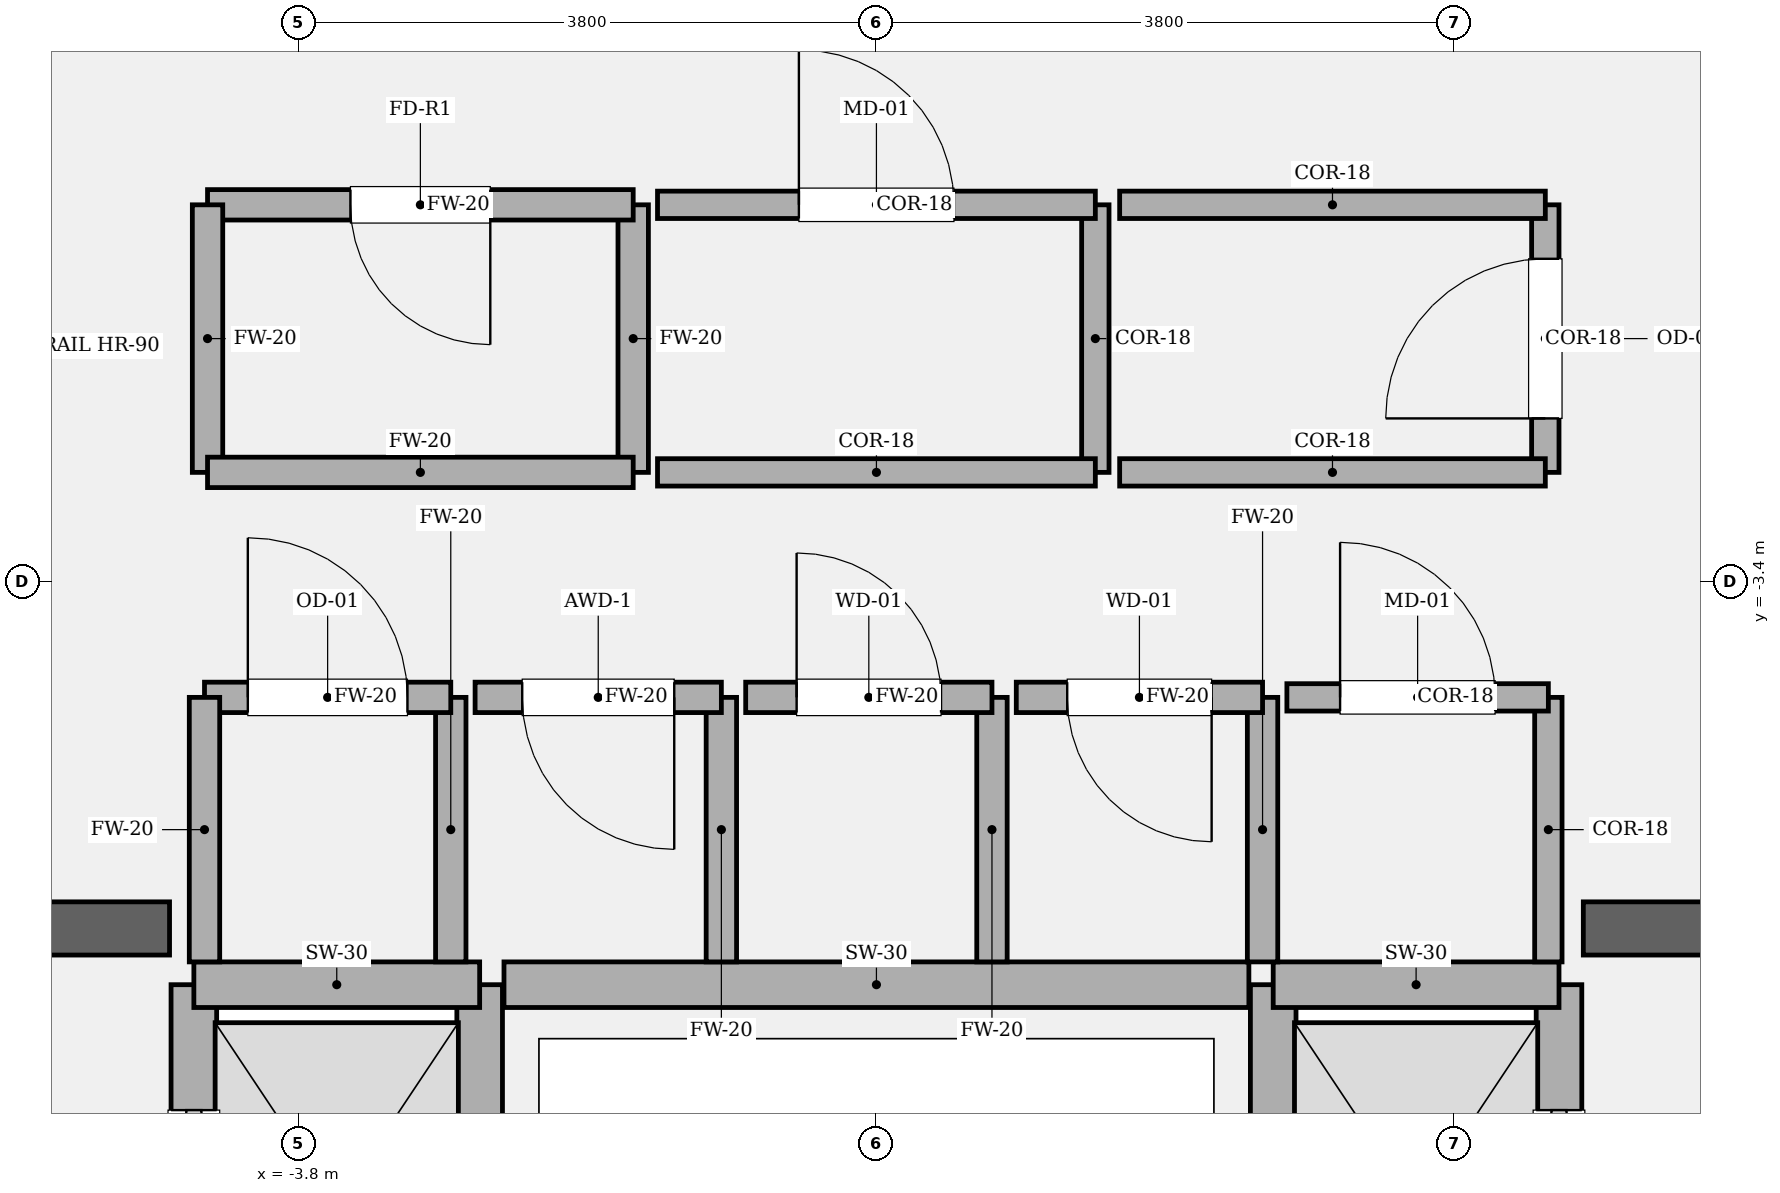
"""IFC4 building model, lengths in metres.
Left out: names, types, materials, properties, quantities, classifications, styles, units other than length and angle.
Written with IfcOpenShell. Run it as: python <this file> out.ifc"""

import sys

from ifc_helpers import new_model, si_unit, direction, frame, frame_2d, origin, place, context, subcontext, project, spatial, rectangle, extrude, element, fill, save


model = new_model("IFC4")
c1 = context("Model", 3, precision=1e-05, world=origin(), true_north=direction((0.0, 1.0)))
c2 = subcontext(c1, "Body", "Model", "MODEL_VIEW")
j1 = project(units=[si_unit("LENGTHUNIT", "METRE"), si_unit("PLANEANGLEUNIT", "RADIAN")], contexts=[c1])
p1 = place(None, origin())
s1 = spatial("IfcSite", under=j1, at=p1, CompositionType="ELEMENT")
p2 = place(p1, origin())
s2 = spatial("IfcBuilding", under=s1, at=p2, CompositionType="ELEMENT")
p3 = place(p2, frame((0.0, 0.0, 304.8)))
s3 = spatial("IfcBuildingStorey", under=s2, at=p3, CompositionType="ELEMENT", Elevation=304.8)
p4 = place(p3, frame((-9.925, -5.68, 0.0), z_axis=(0.0, 0.0, 1.0), x_axis=(1.0, 0.0, 0.0)))
e1 = element("IfcWall", 1, at=p4, inside=s3, PredefinedType="SOLIDWALL", context=c2, shape_type="SweptSolid", body=[
    extrude(rectangle(XDim=5.275, YDim=0.35, at=frame_2d((2.638, 0.0))), origin(), (0.0, 0.0, 1.0), 4.2),
])
p5 = place(p4, frame((1.385, 0.0, 0.0)))
e2 = element("IfcOpeningElement", 2, at=p5, cuts=e1, PredefinedType="OPENING", context=c2, shape_type="SweptSolid", body=[
    extrude(rectangle(XDim=1.18, YDim=2.2, at=frame_2d((0.59, 1.1))), frame((0.0, 0.185, 0.0), z_axis=(0.0, -1.0, 0.0), x_axis=(1.0, 0.0, 0.0)), (0.0, 0.0, 1.0), 0.37),
])
p6 = place(p3, frame((4.65, -5.68, 0.0), z_axis=(0.0, 0.0, 1.0), x_axis=(1.0, 0.0, 0.0)))
e3 = element("IfcWall", 3, at=p6, inside=s3, PredefinedType="SOLIDWALL", context=c2, shape_type="SweptSolid", body=[
    extrude(rectangle(XDim=5.275, YDim=0.35, at=frame_2d((2.638, 0.0))), origin(), (0.0, 0.0, 1.0), 4.2),
])
p7 = place(p6, frame((2.71, 0.0, 0.0)))
e4 = element("IfcOpeningElement", 4, at=p7, cuts=e3, PredefinedType="OPENING", context=c2, shape_type="SweptSolid", body=[
    extrude(rectangle(XDim=1.18, YDim=2.2, at=frame_2d((0.59, 1.1))), frame((0.0, 0.185, 0.0), z_axis=(0.0, -1.0, 0.0), x_axis=(1.0, 0.0, 0.0)), (0.0, 0.0, 1.0), 0.37),
])
p8 = place(p3, frame((-4.49, -8.82, 0.0), z_axis=(0.0, 0.0, 1.0), x_axis=(0.0, 1.0, 0.0)))
e5 = element("IfcWall", 5, at=p8, inside=s3, PredefinedType="SOLIDWALL", context=c2, shape_type="SweptSolid", body=[
    extrude(rectangle(XDim=2.77, YDim=0.3, at=frame_2d((1.385, 0.0))), origin(), (0.0, 0.0, 1.0), 4.0),
])
p9 = place(p8, frame((0.825, 0.0, 0.0)))
e6 = element("IfcOpeningElement", 6, at=p9, cuts=e5, PredefinedType="OPENING", context=c2, shape_type="SweptSolid", body=[
    extrude(rectangle(XDim=1.12, YDim=2.25, at=frame_2d((0.56, 1.125))), frame((0.0, 0.16, 0.0), z_axis=(0.0, -1.0, 0.0), x_axis=(1.0, 0.0, 0.0)), (0.0, 0.0, 1.0), 0.32),
])
p10 = place(p3, frame((-2.61, -8.82, 0.0), z_axis=(0.0, 0.0, 1.0), x_axis=(0.0, 1.0, 0.0)))
e7 = element("IfcWall", 7, at=p10, inside=s3, PredefinedType="SOLIDWALL", context=c2, shape_type="SweptSolid", body=[
    extrude(rectangle(XDim=2.77, YDim=0.3, at=frame_2d((1.385, 0.0))), origin(), (0.0, 0.0, 1.0), 4.0),
])
p11 = place(p3, frame((-4.49, -6.05, 0.0), z_axis=(0.0, 0.0, 1.0), x_axis=(1.0, 0.0, 0.0)))
e8 = element("IfcWall", 8, at=p11, inside=s3, PredefinedType="SOLIDWALL", context=c2, shape_type="SweptSolid", body=[
    extrude(rectangle(XDim=1.88, YDim=0.3, at=frame_2d((0.94, 0.0))), origin(), (0.0, 0.0, 1.0), 4.0),
])
p12 = place(p3, frame((4.49, -8.82, 0.0), z_axis=(0.0, 0.0, 1.0), x_axis=(0.0, 1.0, 0.0)))
e9 = element("IfcWall", 9, at=p12, inside=s3, PredefinedType="SOLIDWALL", context=c2, shape_type="SweptSolid", body=[
    extrude(rectangle(XDim=2.77, YDim=0.3, at=frame_2d((1.385, 0.0))), origin(), (0.0, 0.0, 1.0), 4.0),
])
p13 = place(p12, frame((0.825, 0.0, 0.0)))
e10 = element("IfcOpeningElement", 10, at=p13, cuts=e9, PredefinedType="OPENING", context=c2, shape_type="SweptSolid", body=[
    extrude(rectangle(XDim=1.12, YDim=2.25, at=frame_2d((0.56, 1.125))), frame((0.0, 0.16, 0.0), z_axis=(0.0, -1.0, 0.0), x_axis=(1.0, 0.0, 0.0)), (0.0, 0.0, 1.0), 0.32),
])
p14 = place(p3, frame((2.61, -8.82, 0.0), z_axis=(0.0, 0.0, 1.0), x_axis=(0.0, 1.0, 0.0)))
e11 = element("IfcWall", 11, at=p14, inside=s3, PredefinedType="SOLIDWALL", context=c2, shape_type="SweptSolid", body=[
    extrude(rectangle(XDim=2.77, YDim=0.3, at=frame_2d((1.385, 0.0))), origin(), (0.0, 0.0, 1.0), 4.0),
])
p15 = place(p3, frame((2.61, -6.05, 0.0), z_axis=(0.0, 0.0, 1.0), x_axis=(1.0, 0.0, 0.0)))
e12 = element("IfcWall", 12, at=p15, inside=s3, PredefinedType="SOLIDWALL", context=c2, shape_type="SweptSolid", body=[
    extrude(rectangle(XDim=1.88, YDim=0.3, at=frame_2d((0.94, 0.0))), origin(), (0.0, 0.0, 1.0), 4.0),
])
p16 = place(p3, frame((-2.45, -6.05, 0.0), z_axis=(0.0, 0.0, 1.0), x_axis=(1.0, 0.0, 0.0)))
e13 = element("IfcWall", 13, at=p16, inside=s3, PredefinedType="SOLIDWALL", context=c2, shape_type="SweptSolid", body=[
    extrude(rectangle(XDim=4.9, YDim=0.3, at=frame_2d((2.45, 0.0))), origin(), (0.0, 0.0, 1.0), 4.0),
])
p17 = place(p3, frame((-2.8, -5.9, 0.0), z_axis=(0.0, 0.0, 1.0), x_axis=(0.0, 1.0, 0.0)))
e14 = element("IfcWall", 14, at=p17, inside=s3, PredefinedType="SOLIDWALL", context=c2, shape_type="SweptSolid", body=[
    extrude(rectangle(XDim=1.74, YDim=0.2, at=frame_2d((0.87, 0.0))), origin(), (0.0, 0.0, 1.0), 4.0),
])
p18 = place(p3, frame((-2.8, -4.16, 0.0), z_axis=(0.0, 0.0, 1.0), x_axis=(-1.0, 0.0, 0.0)))
e15 = element("IfcWall", 15, at=p18, inside=s3, PredefinedType="SOLIDWALL", context=c2, shape_type="SweptSolid", body=[
    extrude(rectangle(XDim=1.62, YDim=0.2, at=frame_2d((0.81, 0.0))), origin(), (0.0, 0.0, 1.0), 4.0),
])
p19 = place(p18, frame((0.285, 0.0, 0.0)))
e16 = element("IfcOpeningElement", 16, at=p19, cuts=e15, PredefinedType="OPENING", context=c2, shape_type="SweptSolid", body=[
    extrude(rectangle(XDim=1.05, YDim=2.2, at=frame_2d((0.525, 1.1))), frame((0.0, 0.11, 0.0), z_axis=(0.0, -1.0, 0.0), x_axis=(1.0, 0.0, 0.0)), (0.0, 0.0, 1.0), 0.22),
])
for number, where, z_axis, x_axis in (
    (17, (-4.42, -4.16, 0.0), (0.0, 0.0, 1.0), (0.0, -1.0, 0.0)),
    (18, (-1.02, -5.9, 0.0), (0.0, 0.0, 1.0), (0.0, 1.0, 0.0)),
):
    element("IfcWall", number, at=place(p3, frame(where, z_axis=z_axis, x_axis=x_axis)), inside=s3, PredefinedType="SOLIDWALL", context=c2, shape_type="SweptSolid", body=[
        extrude(rectangle(XDim=1.74, YDim=0.2, at=frame_2d((0.87, 0.0))), origin(), (0.0, 0.0, 1.0), 4.0),
    ])
p20 = place(p3, frame((-1.02, -4.16, 0.0), z_axis=(0.0, 0.0, 1.0), x_axis=(-1.0, 0.0, 0.0)))
e19 = element("IfcWall", 19, at=p20, inside=s3, PredefinedType="SOLIDWALL", context=c2, shape_type="SweptSolid", body=[
    extrude(rectangle(XDim=1.62, YDim=0.2, at=frame_2d((0.81, 0.0))), origin(), (0.0, 0.0, 1.0), 4.0),
])
p21 = place(p20, frame((0.31, 0.0, 0.0)))
e20 = element("IfcOpeningElement", 20, at=p21, cuts=e19, PredefinedType="OPENING", context=c2, shape_type="SweptSolid", body=[
    extrude(rectangle(XDim=1.0, YDim=2.15, at=frame_2d((0.5, 1.075))), frame((0.0, 0.11, 0.0), z_axis=(0.0, -1.0, 0.0), x_axis=(1.0, 0.0, 0.0)), (0.0, 0.0, 1.0), 0.22),
])
p22 = place(p3, frame((0.76, -5.9, 0.0), z_axis=(0.0, 0.0, 1.0), x_axis=(0.0, 1.0, 0.0)))
e21 = element("IfcWall", 21, at=p22, inside=s3, PredefinedType="SOLIDWALL", context=c2, shape_type="SweptSolid", body=[
    extrude(rectangle(XDim=1.74, YDim=0.2, at=frame_2d((0.87, 0.0))), origin(), (0.0, 0.0, 1.0), 4.0),
])
p23 = place(p3, frame((0.76, -4.16, 0.0), z_axis=(0.0, 0.0, 1.0), x_axis=(-1.0, 0.0, 0.0)))
e22 = element("IfcWall", 22, at=p23, inside=s3, PredefinedType="SOLIDWALL", context=c2, shape_type="SweptSolid", body=[
    extrude(rectangle(XDim=1.62, YDim=0.2, at=frame_2d((0.81, 0.0))), origin(), (0.0, 0.0, 1.0), 4.0),
])
p24 = place(p23, frame((0.335, 0.0, 0.0)))
e23 = element("IfcOpeningElement", 23, at=p24, cuts=e22, PredefinedType="OPENING", context=c2, shape_type="SweptSolid", body=[
    extrude(rectangle(XDim=0.95, YDim=2.15, at=frame_2d((0.475, 1.075))), frame((0.0, 0.11, 0.0), z_axis=(0.0, -1.0, 0.0), x_axis=(1.0, 0.0, 0.0)), (0.0, 0.0, 1.0), 0.22),
])
p25 = place(p3, frame((2.54, -5.9, 0.0), z_axis=(0.0, 0.0, 1.0), x_axis=(0.0, 1.0, 0.0)))
e24 = element("IfcWall", 24, at=p25, inside=s3, PredefinedType="SOLIDWALL", context=c2, shape_type="SweptSolid", body=[
    extrude(rectangle(XDim=1.74, YDim=0.2, at=frame_2d((0.87, 0.0))), origin(), (0.0, 0.0, 1.0), 4.0),
])
p26 = place(p3, frame((2.54, -4.16, 0.0), z_axis=(0.0, 0.0, 1.0), x_axis=(-1.0, 0.0, 0.0)))
e25 = element("IfcWall", 25, at=p26, inside=s3, PredefinedType="SOLIDWALL", context=c2, shape_type="SweptSolid", body=[
    extrude(rectangle(XDim=1.62, YDim=0.2, at=frame_2d((0.81, 0.0))), origin(), (0.0, 0.0, 1.0), 4.0),
])
p27 = place(p26, frame((0.335, 0.0, 0.0)))
e26 = element("IfcOpeningElement", 26, at=p27, cuts=e25, PredefinedType="OPENING", context=c2, shape_type="SweptSolid", body=[
    extrude(rectangle(XDim=0.95, YDim=2.15, at=frame_2d((0.475, 1.075))), frame((0.0, 0.11, 0.0), z_axis=(0.0, -1.0, 0.0), x_axis=(1.0, 0.0, 0.0)), (0.0, 0.0, 1.0), 0.22),
])
p28 = place(p3, frame((4.42, -5.9, 0.0), z_axis=(0.0, 0.0, 1.0), x_axis=(0.0, 1.0, 0.0)))
e27 = element("IfcWall", 27, at=p28, inside=s3, PredefinedType="PARTITIONING", context=c2, shape_type="SweptSolid", body=[
    extrude(rectangle(XDim=1.74, YDim=0.18, at=frame_2d((0.87, 0.0))), origin(), (0.0, 0.0, 1.0), 4.0),
])
p29 = place(p3, frame((4.42, -4.16, 0.0), z_axis=(0.0, 0.0, 1.0), x_axis=(-1.0, 0.0, 0.0)))
e28 = element("IfcWall", 28, at=p29, inside=s3, PredefinedType="PARTITIONING", context=c2, shape_type="SweptSolid", body=[
    extrude(rectangle(XDim=1.72, YDim=0.18, at=frame_2d((0.86, 0.0))), origin(), (0.0, 0.0, 1.0), 4.0),
])
p30 = place(p29, frame((0.35, 0.0, 0.0)))
e29 = element("IfcOpeningElement", 29, at=p30, cuts=e28, PredefinedType="OPENING", context=c2, shape_type="SweptSolid", body=[
    extrude(rectangle(XDim=1.02, YDim=2.2, at=frame_2d((0.51, 1.1))), frame((0.0, 0.1, 0.0), z_axis=(0.0, -1.0, 0.0), x_axis=(1.0, 0.0, 0.0)), (0.0, 0.0, 1.0), 0.2),
])
p31 = place(p3, frame((-1.6, -2.68, 0.0), z_axis=(0.0, 0.0, 1.0), x_axis=(0.0, 1.0, 0.0)))
e30 = element("IfcWall", 30, at=p31, inside=s3, PredefinedType="SOLIDWALL", context=c2, shape_type="SweptSolid", body=[
    extrude(rectangle(XDim=1.76, YDim=0.2, at=frame_2d((0.88, 0.0))), origin(), (0.0, 0.0, 1.0), 4.0),
])
p32 = place(p3, frame((-1.6, -0.92, 0.0), z_axis=(0.0, 0.0, 1.0), x_axis=(-1.0, 0.0, 0.0)))
e31 = element("IfcWall", 31, at=p32, inside=s3, PredefinedType="SOLIDWALL", context=c2, shape_type="SweptSolid", body=[
    extrude(rectangle(XDim=2.8, YDim=0.2, at=frame_2d((1.4, 0.0))), origin(), (0.0, 0.0, 1.0), 4.0),
])
p33 = place(p32, frame((0.94, 0.0, 0.0)))
e32 = element("IfcOpeningElement", 32, at=p33, cuts=e31, PredefinedType="OPENING", context=c2, shape_type="SweptSolid", body=[
    extrude(rectangle(XDim=0.92, YDim=2.1, at=frame_2d((0.46, 1.05))), frame((0.0, 0.11, 0.0), z_axis=(0.0, -1.0, 0.0), x_axis=(1.0, 0.0, 0.0)), (0.0, 0.0, 1.0), 0.22),
])
p34 = place(p3, frame((-4.4, -0.92, 0.0), z_axis=(0.0, 0.0, 1.0), x_axis=(0.0, -1.0, 0.0)))
e33 = element("IfcWall", 33, at=p34, inside=s3, PredefinedType="SOLIDWALL", context=c2, shape_type="SweptSolid", body=[
    extrude(rectangle(XDim=1.76, YDim=0.2, at=frame_2d((0.88, 0.0))), origin(), (0.0, 0.0, 1.0), 4.0),
])
p35 = place(p3, frame((-4.4, -2.68, 0.0), z_axis=(0.0, 0.0, 1.0), x_axis=(1.0, 0.0, 0.0)))
e34 = element("IfcWall", 34, at=p35, inside=s3, PredefinedType="SOLIDWALL", context=c2, shape_type="SweptSolid", body=[
    extrude(rectangle(XDim=2.8, YDim=0.2, at=frame_2d((1.4, 0.0))), origin(), (0.0, 0.0, 1.0), 4.0),
])
p36 = place(p3, frame((1.44, -2.68, 0.0), z_axis=(0.0, 0.0, 1.0), x_axis=(0.0, 1.0, 0.0)))
e35 = element("IfcWall", 35, at=p36, inside=s3, PredefinedType="PARTITIONING", context=c2, shape_type="SweptSolid", body=[
    extrude(rectangle(XDim=1.76, YDim=0.18, at=frame_2d((0.88, 0.0))), origin(), (0.0, 0.0, 1.0), 4.0),
])
p37 = place(p3, frame((1.44, -0.92, 0.0), z_axis=(0.0, 0.0, 1.0), x_axis=(-1.0, 0.0, 0.0)))
e36 = element("IfcWall", 36, at=p37, inside=s3, PredefinedType="PARTITIONING", context=c2, shape_type="SweptSolid", body=[
    extrude(rectangle(XDim=2.88, YDim=0.18, at=frame_2d((1.44, 0.0))), origin(), (0.0, 0.0, 1.0), 4.0),
])
p38 = place(p37, frame((0.93, 0.0, 0.0)))
e37 = element("IfcOpeningElement", 37, at=p38, cuts=e36, PredefinedType="OPENING", context=c2, shape_type="SweptSolid", body=[
    extrude(rectangle(XDim=1.02, YDim=2.2, at=frame_2d((0.51, 1.1))), frame((0.0, 0.1, 0.0), z_axis=(0.0, -1.0, 0.0), x_axis=(1.0, 0.0, 0.0)), (0.0, 0.0, 1.0), 0.2),
])
p39 = place(p3, frame((-1.44, -2.68, 0.0), z_axis=(0.0, 0.0, 1.0), x_axis=(1.0, 0.0, 0.0)))
e38 = element("IfcWall", 38, at=p39, inside=s3, PredefinedType="PARTITIONING", context=c2, shape_type="SweptSolid", body=[
    extrude(rectangle(XDim=2.88, YDim=0.18, at=frame_2d((1.44, 0.0))), origin(), (0.0, 0.0, 1.0), 4.0),
])
p40 = place(p3, frame((4.4, -2.68, 0.0), z_axis=(0.0, 0.0, 1.0), x_axis=(0.0, 1.0, 0.0)))
e39 = element("IfcWall", 39, at=p40, inside=s3, PredefinedType="PARTITIONING", context=c2, shape_type="SweptSolid", body=[
    extrude(rectangle(XDim=1.76, YDim=0.18, at=frame_2d((0.88, 0.0))), origin(), (0.0, 0.0, 1.0), 4.0),
])
p41 = place(p40, frame((0.355, 0.0, 0.0)))
e40 = element("IfcOpeningElement", 40, at=p41, cuts=e39, PredefinedType="OPENING", context=c2, shape_type="SweptSolid", body=[
    extrude(rectangle(XDim=1.05, YDim=2.2, at=frame_2d((0.525, 1.1))), frame((0.0, 0.1, 0.0), z_axis=(0.0, -1.0, 0.0), x_axis=(1.0, 0.0, 0.0)), (0.0, 0.0, 1.0), 0.2),
])
for number, where, z_axis, x_axis in (
    (41, (4.4, -0.92, 0.0), (0.0, 0.0, 1.0), (-1.0, 0.0, 0.0)),
    (42, (1.6, -2.68, 0.0), (0.0, 0.0, 1.0), (1.0, 0.0, 0.0)),
):
    element("IfcWall", number, at=place(p3, frame(where, z_axis=z_axis, x_axis=x_axis)), inside=s3, PredefinedType="PARTITIONING", context=c2, shape_type="SweptSolid", body=[
        extrude(rectangle(XDim=2.8, YDim=0.18, at=frame_2d((1.4, 0.0))), origin(), (0.0, 0.0, 1.0), 4.0),
    ])
p42 = place(p9, origin())
e43 = element("IfcDoor", 43, at=p42, inside=s3, OperationType="SLIDING_TO_LEFT", PredefinedType="DOOR", context=c2, shape_type="SweptSolid", body=[
    extrude(rectangle(XDim=1.12, YDim=2.25, at=frame_2d((0.56, 1.125))), frame((0.0, 0.025, 0.0), z_axis=(0.0, -1.0, 0.0), x_axis=(1.0, 0.0, 0.0)), (0.0, 0.0, 1.0), 0.05),
])
fill(e6, e43)
p43 = place(p13, origin())
e44 = element("IfcDoor", 44, at=p43, inside=s3, OperationType="SLIDING_TO_RIGHT", PredefinedType="DOOR", context=c2, shape_type="SweptSolid", body=[
    extrude(rectangle(XDim=1.12, YDim=2.25, at=frame_2d((0.56, 1.125))), frame((0.0, 0.025, 0.0), z_axis=(0.0, -1.0, 0.0), x_axis=(1.0, 0.0, 0.0)), (0.0, 0.0, 1.0), 0.05),
])
fill(e10, e44)
p44 = place(p19, origin())
e45 = element("IfcDoor", 45, at=p44, inside=s3, OperationType="SINGLE_SWING_RIGHT", PredefinedType="DOOR", context=c2, shape_type="SweptSolid", body=[
    extrude(rectangle(XDim=1.05, YDim=2.2, at=frame_2d((0.525, 1.1))), frame((0.0, 0.025, 0.0), z_axis=(0.0, -1.0, 0.0), x_axis=(1.0, 0.0, 0.0)), (0.0, 0.0, 1.0), 0.05),
])
fill(e16, e45)
p45 = place(p21, origin())
e46 = element("IfcDoor", 46, at=p45, inside=s3, OperationType="SINGLE_SWING_LEFT", PredefinedType="DOOR", context=c2, shape_type="SweptSolid", body=[
    extrude(rectangle(XDim=1.0, YDim=2.15, at=frame_2d((0.5, 1.075))), frame((0.0, 0.025, 0.0), z_axis=(0.0, -1.0, 0.0), x_axis=(1.0, 0.0, 0.0)), (0.0, 0.0, 1.0), 0.05),
])
fill(e20, e46)
p46 = place(p24, origin())
e47 = element("IfcDoor", 47, at=p46, inside=s3, OperationType="SINGLE_SWING_RIGHT", PredefinedType="DOOR", context=c2, shape_type="SweptSolid", body=[
    extrude(rectangle(XDim=0.95, YDim=2.15, at=frame_2d((0.475, 1.075))), frame((0.0, 0.025, 0.0), z_axis=(0.0, -1.0, 0.0), x_axis=(1.0, 0.0, 0.0)), (0.0, 0.0, 1.0), 0.05),
])
fill(e23, e47)
p47 = place(p27, origin())
e48 = element("IfcDoor", 48, at=p47, inside=s3, OperationType="SINGLE_SWING_LEFT", PredefinedType="DOOR", context=c2, shape_type="SweptSolid", body=[
    extrude(rectangle(XDim=0.95, YDim=2.15, at=frame_2d((0.475, 1.075))), frame((0.0, 0.025, 0.0), z_axis=(0.0, -1.0, 0.0), x_axis=(1.0, 0.0, 0.0)), (0.0, 0.0, 1.0), 0.05),
])
fill(e26, e48)
p48 = place(p30, origin())
e49 = element("IfcDoor", 49, at=p48, inside=s3, OperationType="SINGLE_SWING_RIGHT", PredefinedType="DOOR", context=c2, shape_type="SweptSolid", body=[
    extrude(rectangle(XDim=1.02, YDim=2.2, at=frame_2d((0.51, 1.1))), frame((0.0, 0.025, 0.0), z_axis=(0.0, -1.0, 0.0), x_axis=(1.0, 0.0, 0.0)), (0.0, 0.0, 1.0), 0.05),
])
fill(e29, e49)
p49 = place(p33, origin())
e50 = element("IfcDoor", 50, at=p49, inside=s3, OperationType="SINGLE_SWING_LEFT", PredefinedType="DOOR", context=c2, shape_type="SweptSolid", body=[
    extrude(rectangle(XDim=0.92, YDim=2.1, at=frame_2d((0.46, 1.05))), frame((0.0, 0.025, 0.0), z_axis=(0.0, -1.0, 0.0), x_axis=(1.0, 0.0, 0.0)), (0.0, 0.0, 1.0), 0.05),
])
fill(e32, e50)
p50 = place(p38, origin())
e51 = element("IfcDoor", 51, at=p50, inside=s3, OperationType="SINGLE_SWING_RIGHT", PredefinedType="DOOR", context=c2, shape_type="SweptSolid", body=[
    extrude(rectangle(XDim=1.02, YDim=2.2, at=frame_2d((0.51, 1.1))), frame((0.0, 0.025, 0.0), z_axis=(0.0, -1.0, 0.0), x_axis=(1.0, 0.0, 0.0)), (0.0, 0.0, 1.0), 0.05),
])
fill(e37, e51)
p51 = place(p41, origin())
e52 = element("IfcDoor", 52, at=p51, inside=s3, OperationType="SINGLE_SWING_LEFT", PredefinedType="DOOR", context=c2, shape_type="SweptSolid", body=[
    extrude(rectangle(XDim=1.05, YDim=2.2, at=frame_2d((0.525, 1.1))), frame((0.0, 0.025, 0.0), z_axis=(0.0, -1.0, 0.0), x_axis=(1.0, 0.0, 0.0)), (0.0, 0.0, 1.0), 0.05),
])
fill(e40, e52)
save(model, sys.argv[1])
